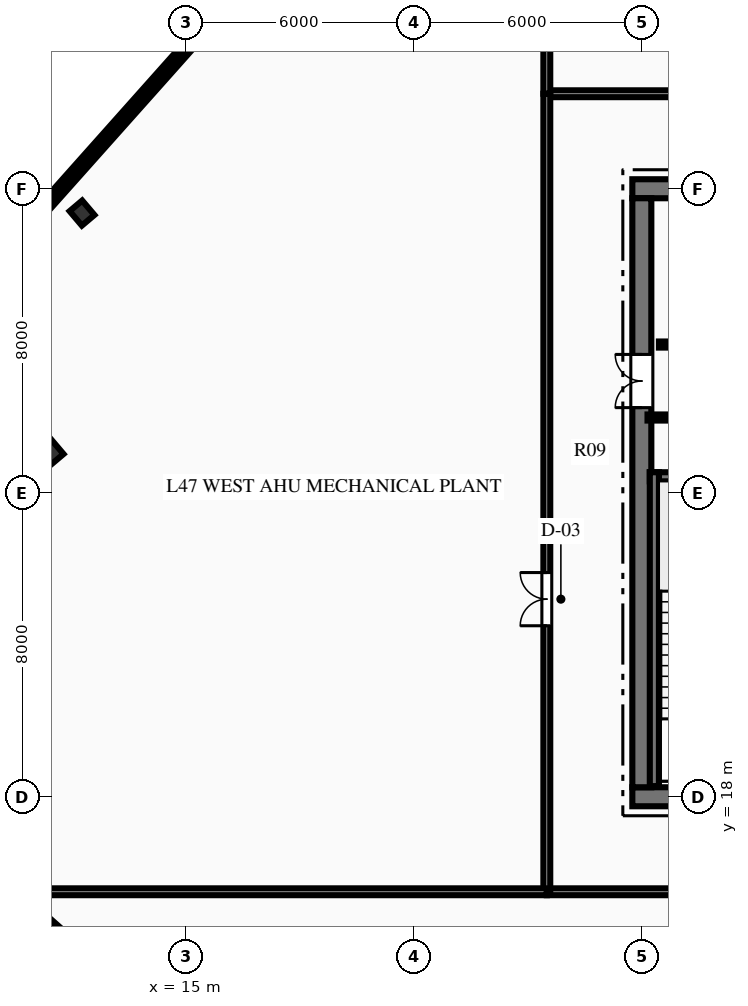
"""IFC4 building model, lengths in metres.
Left out: names, types, materials, properties, quantities, classifications, styles, units other than length and angle.
Written with IfcOpenShell. Run it as: python <this file> out.ifc"""

import sys

from ifc_helpers import new_model, si_unit, direction, frame, frame_2d, origin, origin_2d, place, context, subcontext, project, spatial, rectangle, hollow_rectangle, i_section, extrude, element, fill, save


model = new_model("IFC4")
c1 = context("Model", 3, precision=1e-05, world=origin(), true_north=direction((0.0, 1.0)))
c2 = subcontext(c1, "Body", "Model", "MODEL_VIEW")
j1 = project(units=[si_unit("LENGTHUNIT", "METRE"), si_unit("PLANEANGLEUNIT", "RADIAN")], contexts=[c1])
p1 = place(None, origin())
s1 = spatial("IfcSite", under=j1, at=p1, CompositionType="ELEMENT")
p2 = place(p1, origin())
s2 = spatial("IfcBuilding", under=s1, at=p2, CompositionType="ELEMENT")
p3 = place(p2, frame((0.0, 0.0, 189.45)))
s3 = spatial("IfcBuildingStorey", under=s2, at=p3, CompositionType="ELEMENT", Elevation=189.45)
p4 = place(p3, frame((26.75, 18.0, 0.0), z_axis=(0.0, 0.0, 1.0), x_axis=(1.0, 0.0, 0.0)))
e1 = element("IfcWall", 1, at=p4, inside=s3, PredefinedType="SHEAR", context=c2, shape_type="SweptSolid", body=[
    extrude(rectangle(XDim=18.5, YDim=0.5, at=frame_2d((9.25, 0.0))), origin(), (0.0, 0.0, 1.0), 4.5),
])
p5 = place(p4, frame((7.35, 0.0, 0.0)))
e2 = element("IfcOpeningElement", 2, at=p5, cuts=e1, PredefinedType="OPENING", context=c2, shape_type="SweptSolid", body=[
    extrude(rectangle(XDim=1.1, YDim=2.15, at=frame_2d((0.55, 1.075))), frame((0.0, 0.26, 0.0), z_axis=(0.0, -1.0, 0.0), x_axis=(1.0, 0.0, 0.0)), (0.0, 0.0, 1.0), 0.52),
])
p6 = place(p4, frame((10.05, 0.0, 0.0)))
e3 = element("IfcOpeningElement", 3, at=p6, cuts=e1, PredefinedType="OPENING", context=c2, shape_type="SweptSolid", body=[
    extrude(rectangle(XDim=1.1, YDim=2.15, at=frame_2d((0.55, 1.075))), frame((0.0, 0.26, 0.0), z_axis=(0.0, -1.0, 0.0), x_axis=(1.0, 0.0, 0.0)), (0.0, 0.0, 1.0), 0.52),
])
p7 = place(p3, frame((26.75, 34.0, 0.0), z_axis=(0.0, 0.0, 1.0), x_axis=(1.0, 0.0, 0.0)))
e4 = element("IfcWall", 4, at=p7, inside=s3, PredefinedType="SHEAR", context=c2, shape_type="SweptSolid", body=[
    extrude(rectangle(XDim=18.5, YDim=0.5, at=frame_2d((9.25, 0.0))), origin(), (0.0, 0.0, 1.0), 4.5),
])
p8 = place(p7, frame((5.545, 0.0, 0.0)))
e5 = element("IfcOpeningElement", 5, at=p8, cuts=e4, PredefinedType="OPENING", context=c2, shape_type="SweptSolid", body=[
    extrude(rectangle(XDim=1.05, YDim=2.15, at=frame_2d((0.525, 1.075))), frame((0.0, 0.26, 0.0), z_axis=(0.0, -1.0, 0.0), x_axis=(1.0, 0.0, 0.0)), (0.0, 0.0, 1.0), 0.52),
])
p9 = place(p7, frame((13.935, 0.0, 0.0)))
e6 = element("IfcOpeningElement", 6, at=p9, cuts=e4, PredefinedType="OPENING", context=c2, shape_type="SweptSolid", body=[
    extrude(rectangle(XDim=1.1, YDim=2.15, at=frame_2d((0.55, 1.075))), frame((0.0, 0.26, 0.0), z_axis=(0.0, -1.0, 0.0), x_axis=(1.0, 0.0, 0.0)), (0.0, 0.0, 1.0), 0.52),
])
p10 = place(p7, frame((16.185, 0.0, 0.0)))
e7 = element("IfcOpeningElement", 7, at=p10, cuts=e4, PredefinedType="OPENING", context=c2, shape_type="SweptSolid", body=[
    extrude(rectangle(XDim=1.1, YDim=2.15, at=frame_2d((0.55, 1.075))), frame((0.0, 0.26, 0.0), z_axis=(0.0, -1.0, 0.0), x_axis=(1.0, 0.0, 0.0)), (0.0, 0.0, 1.0), 0.52),
])
p11 = place(p3, frame((27.0, 18.25, 0.0), z_axis=(0.0, 0.0, 1.0), x_axis=(0.0, 1.0, 0.0)))
e8 = element("IfcWall", 8, at=p11, inside=s3, PredefinedType="SHEAR", context=c2, shape_type="SweptSolid", body=[
    extrude(rectangle(XDim=15.5, YDim=0.5, at=frame_2d((7.75, 0.0))), origin(), (0.0, 0.0, 1.0), 4.5),
])
p12 = place(p11, frame((9.99, 0.0, 0.0)))
e9 = element("IfcOpeningElement", 9, at=p12, cuts=e8, PredefinedType="OPENING", context=c2, shape_type="SweptSolid", body=[
    extrude(rectangle(XDim=1.4, YDim=2.2, at=frame_2d((0.7, 1.1))), frame((0.0, 0.26, 0.0), z_axis=(0.0, -1.0, 0.0), x_axis=(1.0, 0.0, 0.0)), (0.0, 0.0, 1.0), 0.52),
])
p13 = place(p3, frame((27.21, 26.42, 0.0), z_axis=(0.0, 0.0, 1.0), x_axis=(1.0, 0.0, 0.0)))
e10 = element("IfcWall", 10, at=p13, inside=s3, PredefinedType="SHEAR", context=c2, shape_type="SweptSolid", body=[
    extrude(rectangle(XDim=3.98, YDim=0.24, at=frame_2d((1.99, 0.0))), origin(), (0.0, 0.0, 1.0), 4.5),
])
p14 = place(p3, frame((27.33, 18.28, 0.0), z_axis=(0.0, 0.0, 1.0), x_axis=(0.0, 1.0, 0.0)))
e11 = element("IfcWall", 11, at=p14, inside=s3, PredefinedType="SHEAR", context=c2, shape_type="SweptSolid", body=[
    extrude(rectangle(XDim=8.26, YDim=0.24, at=frame_2d((4.13, 0.0))), origin(), (0.0, 0.0, 1.0), 4.5),
])
p15 = place(p3, frame((10.761, 27.104, 0.0), z_axis=(0.0, 0.0, 1.0), x_axis=(0.763232469783, 0.646123979643, 0.0)))
e12 = element("IfcColumn", 12, at=p15, inside=s3, PredefinedType="COLUMN", context=c2, shape_type="SweptSolid", body=[
    extrude(hollow_rectangle(XDim=1.45, YDim=1.45, WallThickness=0.07, at=origin_2d()), origin(), (0.0, 0.0, 1.0), 4.5),
])
p16 = place(p3, frame((12.27, 33.36, 0.0), z_axis=(0.0, 0.0, 1.0), x_axis=(0.763232469783, 0.646123979643, 0.0)))
e13 = element("IfcColumn", 13, at=p16, inside=s3, PredefinedType="COLUMN", context=c2, shape_type="SweptSolid", body=[
    extrude(i_section(OverallWidth=0.432, OverallDepth=0.498, WebThickness=0.056, FlangeThickness=0.089, at=origin_2d()), origin(), (0.0, 0.0, 1.0), 4.5),
])
p17 = place(p3, frame((4.621, 26.032, 0.0), z_axis=(0.0, 0.0, 1.0), x_axis=(0.665232628424, 0.746636156425, 0.0)))
e14 = element("IfcWall", 14, at=p17, inside=s3, PredefinedType="STANDARD", context=c2, shape_type="SweptSolid", body=[
    extrude(rectangle(XDim=20.85, YDim=0.28, at=frame_2d((10.425, 0.0))), origin(), (0.0, 0.0, 1.0), 1.15),
])
p18 = place(p3, frame((19.609, 7.321, 0.0), z_axis=(0.0, 0.0, 1.0), x_axis=(-0.746632335794, 0.665236916554, 0.0)))
e15 = element("IfcWall", 15, at=p18, inside=s3, PredefinedType="STANDARD", context=c2, shape_type="SweptSolid", body=[
    extrude(rectangle(XDim=19.637, YDim=0.28, at=frame_2d((9.819, 0.0))), origin(), (0.0, 0.0, 1.0), 1.15),
])
p19 = place(p3, frame((27.15, 27.98, 0.0), z_axis=(0.0, 0.0, 1.0), x_axis=(1.0, 0.0, 0.0)))
e16 = element("IfcWall", 16, at=p19, inside=s3, PredefinedType="PARTITIONING", context=c2, shape_type="SweptSolid", body=[
    extrude(rectangle(XDim=4.05, YDim=0.16, at=frame_2d((2.025, 0.0))), origin(), (0.0, 0.0, 1.0), 4.09),
])
p20 = place(p19, frame((1.575, 0.0, 0.0)))
e17 = element("IfcOpeningElement", 17, at=p20, cuts=e16, PredefinedType="OPENING", context=c2, shape_type="SweptSolid", body=[
    extrude(rectangle(XDim=0.95, YDim=2.15, at=frame_2d((0.475, 1.075))), frame((0.0, 0.09, 0.0), z_axis=(0.0, -1.0, 0.0), x_axis=(1.0, 0.0, 0.0)), (0.0, 0.0, 1.0), 0.18),
])
p21 = place(p3, frame((27.45, 29.9, 0.0), z_axis=(0.0, 0.0, 1.0), x_axis=(1.0, 0.0, 0.0)))
e18 = element("IfcWall", 18, at=p21, inside=s3, PredefinedType="PARTITIONING", context=c2, shape_type="SweptSolid", body=[
    extrude(rectangle(XDim=4.43, YDim=0.16, at=frame_2d((2.215, 0.0))), origin(), (0.0, 0.0, 1.0), 4.09),
])
p22 = place(p21, frame((1.675, 0.0, 0.0)))
e19 = element("IfcOpeningElement", 19, at=p22, cuts=e18, PredefinedType="OPENING", context=c2, shape_type="SweptSolid", body=[
    extrude(rectangle(XDim=0.95, YDim=2.15, at=frame_2d((0.475, 1.075))), frame((0.0, 0.09, 0.0), z_axis=(0.0, -1.0, 0.0), x_axis=(1.0, 0.0, 0.0)), (0.0, 0.0, 1.0), 0.18),
])
p23 = place(p3, frame((24.5, 15.5, 0.0), z_axis=(0.0, 0.0, 1.0), x_axis=(1.0, 0.0, 0.0)))
e20 = element("IfcWall", 20, at=p23, inside=s3, PredefinedType="PARTITIONING", context=c2, shape_type="SweptSolid", body=[
    extrude(rectangle(XDim=23.0, YDim=0.18, at=frame_2d((11.5, 0.0))), origin(), (0.0, 0.0, 1.0), 4.09),
])
p24 = place(p23, frame((7.15, 0.0, 0.0)))
e21 = element("IfcOpeningElement", 21, at=p24, cuts=e20, PredefinedType="OPENING", context=c2, shape_type="SweptSolid", body=[
    extrude(rectangle(XDim=1.1, YDim=2.15, at=frame_2d((0.55, 1.075))), frame((0.0, 0.1, 0.0), z_axis=(0.0, -1.0, 0.0), x_axis=(1.0, 0.0, 0.0)), (0.0, 0.0, 1.0), 0.2),
])
p25 = place(p23, frame((13.3, 0.0, 0.0)))
e22 = element("IfcOpeningElement", 22, at=p25, cuts=e20, PredefinedType="OPENING", context=c2, shape_type="SweptSolid", body=[
    extrude(rectangle(XDim=1.1, YDim=2.15, at=frame_2d((0.55, 1.075))), frame((0.0, 0.1, 0.0), z_axis=(0.0, -1.0, 0.0), x_axis=(1.0, 0.0, 0.0)), (0.0, 0.0, 1.0), 0.2),
])
p26 = place(p3, frame((24.5, 36.5, 0.0), z_axis=(0.0, 0.0, 1.0), x_axis=(1.0, 0.0, 0.0)))
e23 = element("IfcWall", 23, at=p26, inside=s3, PredefinedType="PARTITIONING", context=c2, shape_type="SweptSolid", body=[
    extrude(rectangle(XDim=23.0, YDim=0.18, at=frame_2d((11.5, 0.0))), origin(), (0.0, 0.0, 1.0), 4.09),
])
p27 = place(p26, frame((7.15, 0.0, 0.0)))
e24 = element("IfcOpeningElement", 24, at=p27, cuts=e23, PredefinedType="OPENING", context=c2, shape_type="SweptSolid", body=[
    extrude(rectangle(XDim=1.1, YDim=2.15, at=frame_2d((0.55, 1.075))), frame((0.0, 0.1, 0.0), z_axis=(0.0, -1.0, 0.0), x_axis=(1.0, 0.0, 0.0)), (0.0, 0.0, 1.0), 0.2),
])
p28 = place(p26, frame((14.75, 0.0, 0.0)))
e25 = element("IfcOpeningElement", 25, at=p28, cuts=e23, PredefinedType="OPENING", context=c2, shape_type="SweptSolid", body=[
    extrude(rectangle(XDim=1.1, YDim=2.15, at=frame_2d((0.55, 1.075))), frame((0.0, 0.1, 0.0), z_axis=(0.0, -1.0, 0.0), x_axis=(1.0, 0.0, 0.0)), (0.0, 0.0, 1.0), 0.2),
])
p29 = place(p3, frame((24.5, 15.5, 0.0), z_axis=(0.0, 0.0, 1.0), x_axis=(0.0, 1.0, 0.0)))
e26 = element("IfcWall", 26, at=p29, inside=s3, PredefinedType="PARTITIONING", context=c2, shape_type="SweptSolid", body=[
    extrude(rectangle(XDim=21.0, YDim=0.18, at=frame_2d((10.5, 0.0))), origin(), (0.0, 0.0, 1.0), 4.09),
])
p30 = place(p29, frame((7.0, 0.0, 0.0)))
e27 = element("IfcOpeningElement", 27, at=p30, cuts=e26, PredefinedType="OPENING", context=c2, shape_type="SweptSolid", body=[
    extrude(rectangle(XDim=1.4, YDim=2.2, at=frame_2d((0.7, 1.1))), frame((0.0, 0.1, 0.0), z_axis=(0.0, -1.0, 0.0), x_axis=(1.0, 0.0, 0.0)), (0.0, 0.0, 1.0), 0.2),
])
p31 = place(p3, frame((10.49, 15.5, 0.0), z_axis=(0.0, 0.0, 1.0), x_axis=(1.0, 0.0, 0.0)))
e28 = element("IfcWall", 28, at=p31, inside=s3, PredefinedType="PARTITIONING", context=c2, shape_type="SweptSolid", body=[
    extrude(rectangle(XDim=14.01, YDim=0.18, at=frame_2d((7.005, 0.0))), origin(), (0.0, 0.0, 1.0), 3.469),
])
p32 = place(p3, frame((24.5, 36.5, 0.0), z_axis=(0.0, 0.0, 1.0), x_axis=(0.0, 1.0, 0.0)))
e29 = element("IfcWall", 29, at=p32, inside=s3, PredefinedType="PARTITIONING", context=c2, shape_type="SweptSolid", body=[
    extrude(rectangle(XDim=11.783, YDim=0.18, at=frame_2d((5.892, 0.0))), origin(), (0.0, 0.0, 1.0), 4.09),
])
p33 = place(p12, origin())
e30 = element("IfcDoor", 30, at=p33, inside=s3, OperationType="DOUBLE_DOOR_SINGLE_SWING", PredefinedType="DOOR", context=c2, shape_type="SweptSolid", body=[
    extrude(rectangle(XDim=1.4, YDim=2.2, at=frame_2d((0.7, 1.1))), frame((0.0, 0.025, 0.0), z_axis=(0.0, -1.0, 0.0), x_axis=(1.0, 0.0, 0.0)), (0.0, 0.0, 1.0), 0.05),
])
fill(e9, e30)
p34 = place(p30, origin())
e31 = element("IfcDoor", 31, at=p34, inside=s3, OperationType="DOUBLE_DOOR_SINGLE_SWING", PredefinedType="DOOR", context=c2, shape_type="SweptSolid", body=[
    extrude(rectangle(XDim=1.4, YDim=2.2, at=frame_2d((0.7, 1.1))), frame((0.0, 0.025, 0.0), z_axis=(0.0, -1.0, 0.0), x_axis=(1.0, 0.0, 0.0)), (0.0, 0.0, 1.0), 0.05),
])
fill(e27, e31)
save(model, sys.argv[1])
